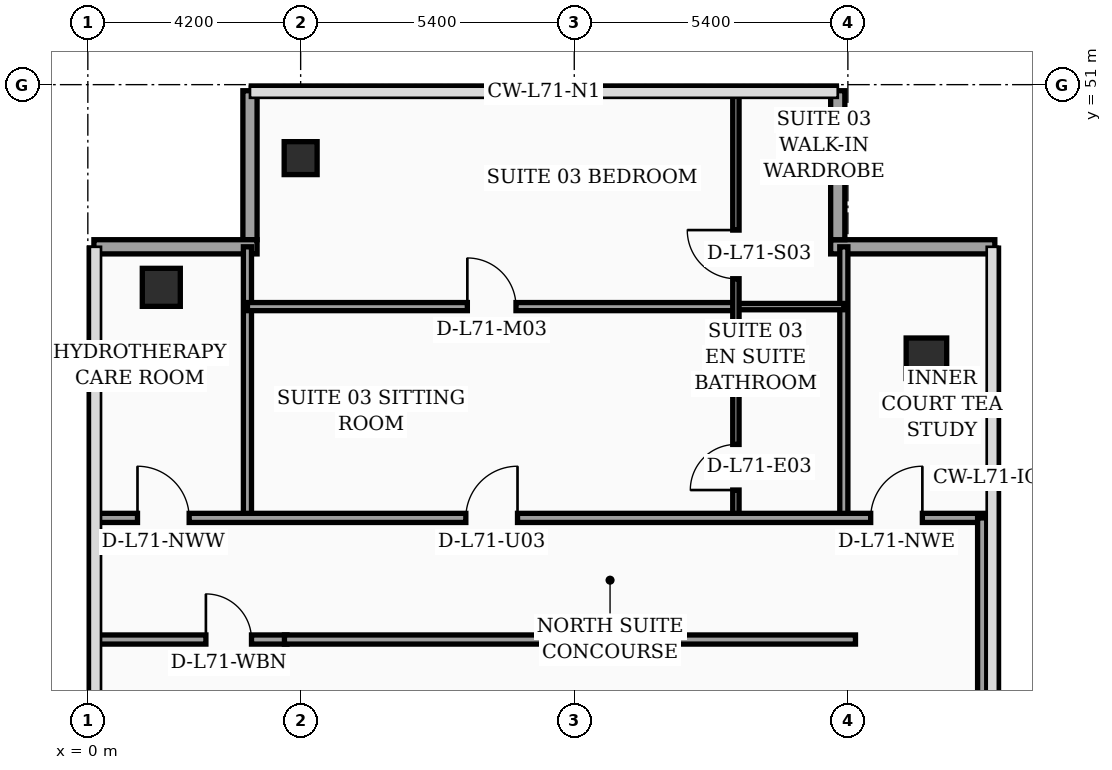
"""IFC4 building model, lengths in metres.
Left out: names, types, materials, properties, quantities, classifications, styles, units other than length and angle.
Written with IfcOpenShell. Run it as: python <this file> out.ifc"""

import sys

from ifc_helpers import new_model, si_unit, direction, frame, frame_2d, origin, origin_2d, place, context, subcontext, project, spatial, rectangle, hollow_rectangle, extrude, element, fill, save


model = new_model("IFC4")
c1 = context("Model", 3, precision=1e-05, world=origin(), true_north=direction((0.0, 1.0)))
c2 = subcontext(c1, "Body", "Model", "MODEL_VIEW")
j1 = project(units=[si_unit("LENGTHUNIT", "METRE"), si_unit("PLANEANGLEUNIT", "RADIAN")], contexts=[c1])
p1 = place(None, origin())
s1 = spatial("IfcSite", under=j1, at=p1, CompositionType="ELEMENT")
p2 = place(p1, origin())
s2 = spatial("IfcBuilding", under=s1, at=p2, CompositionType="ELEMENT")
p3 = place(p2, frame((0.0, 0.0, 287.3)))
s3 = spatial("IfcBuildingStorey", under=s2, at=p3, CompositionType="ELEMENT", Elevation=287.3)
p4 = place(p3, frame((1.45, 47.0, 0.0), z_axis=(0.0, 0.0, 1.0), x_axis=(1.0, 0.0, 0.0)))
e1 = element("IfcColumn", 1, at=p4, inside=s3, PredefinedType="COLUMN", context=c2, shape_type="SweptSolid", body=[
    extrude(hollow_rectangle(XDim=0.75, YDim=0.75, WallThickness=0.032, at=origin_2d()), origin(), (0.0, 0.0, 1.0), 3.56),
])
p5 = place(p3, frame((4.2, 49.55, 0.0), z_axis=(0.0, 0.0, 1.0), x_axis=(1.0, 0.0, 0.0)))
e2 = element("IfcColumn", 2, at=p5, inside=s3, PredefinedType="COLUMN", context=c2, shape_type="SweptSolid", body=[
    extrude(hollow_rectangle(XDim=0.65, YDim=0.65, WallThickness=0.028, at=origin_2d()), origin(), (0.0, 0.0, 1.0), 3.56),
])
p6 = place(p3, frame((16.55, 45.6, 0.0), z_axis=(0.0, 0.0, 1.0), x_axis=(1.0, 0.0, 0.0)))
e3 = element("IfcColumn", 3, at=p6, inside=s3, PredefinedType="COLUMN", context=c2, shape_type="SweptSolid", body=[
    extrude(rectangle(XDim=0.8, YDim=0.8, at=origin_2d()), origin(), (0.0, 0.0, 1.0), 3.56),
])
p7 = place(p3, frame((17.9, 47.8, 0.0), z_axis=(0.0, 0.0, 1.0), x_axis=(-1.0, 0.0, 0.0)))
e4 = element("IfcWall", 4, at=p7, inside=s3, PredefinedType="SOLIDWALL", context=c2, shape_type="SweptSolid", body=[
    extrude(rectangle(XDim=3.24, YDim=0.28, at=frame_2d((1.62, 0.0))), origin(), (0.0, 0.0, 1.0), 3.56),
])
p8 = place(p3, frame((14.8, 47.94, 0.0), z_axis=(0.0, 0.0, 1.0), x_axis=(0.0, 1.0, 0.0)))
e5 = element("IfcWall", 5, at=p8, inside=s3, PredefinedType="SOLIDWALL", context=c2, shape_type="SweptSolid", body=[
    extrude(rectangle(XDim=2.94, YDim=0.28, at=frame_2d((1.47, 0.0))), origin(), (0.0, 0.0, 1.0), 3.56),
])
p9 = place(p3, frame((3.2, 50.88, 0.0), z_axis=(0.0, 0.0, 1.0), x_axis=(0.0, -1.0, 0.0)))
e6 = element("IfcWall", 6, at=p9, inside=s3, PredefinedType="SOLIDWALL", context=c2, shape_type="SweptSolid", body=[
    extrude(rectangle(XDim=2.94, YDim=0.28, at=frame_2d((1.47, 0.0))), origin(), (0.0, 0.0, 1.0), 3.09),
])
p10 = place(p3, frame((3.34, 47.8, 0.0), z_axis=(0.0, 0.0, 1.0), x_axis=(-1.0, 0.0, 0.0)))
e7 = element("IfcWall", 7, at=p10, inside=s3, PredefinedType="SOLIDWALL", context=c2, shape_type="SweptSolid", body=[
    extrude(rectangle(XDim=3.22, YDim=0.28, at=frame_2d((1.61, 0.0))), origin(), (0.0, 0.0, 1.0), 3.09),
])
p11 = place(p3, frame((0.08, 40.05, 0.0), z_axis=(0.0, 0.0, 1.0), x_axis=(1.0, 0.0, 0.0)))
e8 = element("IfcWall", 8, at=p11, inside=s3, PredefinedType="PARTITIONING", context=c2, shape_type="SweptSolid", body=[
    extrude(rectangle(XDim=3.85, YDim=0.18, at=frame_2d((1.925, 0.0))), origin(), (0.0, 0.0, 1.0), 2.99),
])
p12 = place(p11, frame((2.25, 0.0, 0.0)))
e9 = element("IfcOpeningElement", 9, at=p12, cuts=e8, PredefinedType="OPENING", context=c2, shape_type="SweptSolid", body=[
    extrude(rectangle(XDim=0.9, YDim=2.15, at=frame_2d((0.45, 1.075))), frame((0.0, 0.1, 0.0), z_axis=(0.0, -1.0, 0.0), x_axis=(1.0, 0.0, 0.0)), (0.0, 0.0, 1.0), 0.2),
])
p13 = place(p3, frame((3.15, 42.45, 0.0), z_axis=(0.0, 0.0, 1.0), x_axis=(0.0, 1.0, 0.0)))
e10 = element("IfcWall", 10, at=p13, inside=s3, PredefinedType="PARTITIONING", context=c2, shape_type="SweptSolid", body=[
    extrude(rectangle(XDim=5.35, YDim=0.16, at=frame_2d((2.675, 0.0))), origin(), (0.0, 0.0, 1.0), 3.14),
])
p14 = place(p3, frame((14.92, 42.45, 0.0), z_axis=(0.0, 0.0, 1.0), x_axis=(0.0, 1.0, 0.0)))
e11 = element("IfcWall", 11, at=p14, inside=s3, PredefinedType="PARTITIONING", context=c2, shape_type="SweptSolid", body=[
    extrude(rectangle(XDim=5.35, YDim=0.16, at=frame_2d((2.675, 0.0))), origin(), (0.0, 0.0, 1.0), 3.09),
])
p15 = place(p3, frame((12.79, 46.62, 0.0), z_axis=(0.0, 0.0, 1.0), x_axis=(1.0, 0.0, 0.0)))
e12 = element("IfcWall", 12, at=p15, inside=s3, PredefinedType="PARTITIONING", context=c2, shape_type="SweptSolid", body=[
    extrude(rectangle(XDim=2.13, YDim=0.125, at=frame_2d((1.065, 0.0))), origin(), (0.0, 0.0, 1.0), 3.09),
])
p16 = place(p3, frame((3.15, 46.62, 0.0), z_axis=(0.0, 0.0, 1.0), x_axis=(1.0, 0.0, 0.0)))
e13 = element("IfcWall", 13, at=p16, inside=s3, PredefinedType="PARTITIONING", context=c2, shape_type="SweptSolid", body=[
    extrude(rectangle(XDim=9.64, YDim=0.16, at=frame_2d((4.82, 0.0))), origin(), (0.0, 0.0, 1.0), 2.99),
])
p17 = place(p16, frame((4.34, 0.0, 0.0)))
e14 = element("IfcOpeningElement", 14, at=p17, cuts=e13, PredefinedType="OPENING", context=c2, shape_type="SweptSolid", body=[
    extrude(rectangle(XDim=0.96, YDim=2.2, at=frame_2d((0.48, 1.1))), frame((0.0, 0.09, 0.0), z_axis=(0.0, -1.0, 0.0), x_axis=(1.0, 0.0, 0.0)), (0.0, 0.0, 1.0), 0.18),
])
p18 = place(p3, frame((12.79, 42.45, 0.0), z_axis=(0.0, 0.0, 1.0), x_axis=(0.0, 1.0, 0.0)))
e15 = element("IfcWall", 15, at=p18, inside=s3, PredefinedType="PARTITIONING", context=c2, shape_type="SweptSolid", body=[
    extrude(rectangle(XDim=8.49, YDim=0.125, at=frame_2d((4.245, 0.0))), origin(), (0.0, 0.0, 1.0), 3.09),
])
p19 = place(p18, frame((0.55, 0.0, 0.0)))
e16 = element("IfcOpeningElement", 16, at=p19, cuts=e15, PredefinedType="OPENING", context=c2, shape_type="SweptSolid", body=[
    extrude(rectangle(XDim=0.9, YDim=2.15, at=frame_2d((0.45, 1.075))), frame((0.0, 0.073, 0.0), z_axis=(0.0, -1.0, 0.0), x_axis=(1.0, 0.0, 0.0)), (0.0, 0.0, 1.0), 0.145),
])
p20 = place(p18, frame((4.72, 0.0, 0.0)))
e17 = element("IfcOpeningElement", 17, at=p20, cuts=e15, PredefinedType="OPENING", context=c2, shape_type="SweptSolid", body=[
    extrude(rectangle(XDim=0.96, YDim=2.2, at=frame_2d((0.48, 1.1))), frame((0.0, 0.073, 0.0), z_axis=(0.0, -1.0, 0.0), x_axis=(1.0, 0.0, 0.0)), (0.0, 0.0, 1.0), 0.145),
])
p21 = place(p3, frame((0.08, 42.45, 0.0), z_axis=(0.0, 0.0, 1.0), x_axis=(1.0, 0.0, 0.0)))
e18 = element("IfcWall", 18, at=p21, inside=s3, PredefinedType="PARTITIONING", context=c2, shape_type="SweptSolid", body=[
    extrude(rectangle(XDim=17.77, YDim=0.18, at=frame_2d((8.885, 0.0))), origin(), (0.0, 0.0, 1.0), 2.99),
])
p22 = place(p21, frame((0.9, 0.0, 0.0)))
e19 = element("IfcOpeningElement", 19, at=p22, cuts=e18, PredefinedType="OPENING", context=c2, shape_type="SweptSolid", body=[
    extrude(rectangle(XDim=1.02, YDim=2.2, at=frame_2d((0.51, 1.1))), frame((0.0, 0.1, 0.0), z_axis=(0.0, -1.0, 0.0), x_axis=(1.0, 0.0, 0.0)), (0.0, 0.0, 1.0), 0.2),
])
p23 = place(p21, frame((7.38, 0.0, 0.0)))
e20 = element("IfcOpeningElement", 20, at=p23, cuts=e18, PredefinedType="OPENING", context=c2, shape_type="SweptSolid", body=[
    extrude(rectangle(XDim=1.02, YDim=2.2, at=frame_2d((0.51, 1.1))), frame((0.0, 0.1, 0.0), z_axis=(0.0, -1.0, 0.0), x_axis=(1.0, 0.0, 0.0)), (0.0, 0.0, 1.0), 0.2),
])
p24 = place(p21, frame((15.37, 0.0, 0.0)))
e21 = element("IfcOpeningElement", 21, at=p24, cuts=e18, PredefinedType="OPENING", context=c2, shape_type="SweptSolid", body=[
    extrude(rectangle(XDim=1.02, YDim=2.2, at=frame_2d((0.51, 1.1))), frame((0.0, 0.1, 0.0), z_axis=(0.0, -1.0, 0.0), x_axis=(1.0, 0.0, 0.0)), (0.0, 0.0, 1.0), 0.2),
])
p25 = place(p3, frame((17.65, 24.3, 0.0), z_axis=(0.0, 0.0, 1.0), x_axis=(0.0, 1.0, 0.0)))
e22 = element("IfcWall", 22, at=p25, inside=s3, PredefinedType="PARTITIONING", context=c2, shape_type="SweptSolid", body=[
    extrude(rectangle(XDim=18.15, YDim=0.18, at=frame_2d((9.075, 0.0))), origin(), (0.0, 0.0, 1.0), 2.99),
])
p26 = place(p25, frame((3.2, 0.0, 0.0)))
e23 = element("IfcOpeningElement", 23, at=p26, cuts=e22, PredefinedType="OPENING", context=c2, shape_type="SweptSolid", body=[
    extrude(rectangle(XDim=1.02, YDim=2.2, at=frame_2d((0.51, 1.1))), frame((0.0, 0.1, 0.0), z_axis=(0.0, -1.0, 0.0), x_axis=(1.0, 0.0, 0.0)), (0.0, 0.0, 1.0), 0.2),
])
p27 = place(p3, frame((3.88, 40.05, 0.0), z_axis=(0.0, 0.0, 1.0), x_axis=(1.0, 0.0, 0.0)))
e24 = element("IfcWall", 24, at=p27, inside=s3, PredefinedType="PARTITIONING", context=c2, shape_type="SweptSolid", body=[
    extrude(rectangle(XDim=11.27, YDim=0.18, at=frame_2d((5.635, 0.0))), origin(), (0.0, 0.0, 1.0), 2.99),
])
p28 = place(p12, origin())
e25 = element("IfcDoor", 25, at=p28, inside=s3, OperationType="SINGLE_SWING_LEFT", PredefinedType="DOOR", context=c2, shape_type="SweptSolid", body=[
    extrude(rectangle(XDim=0.9, YDim=2.15, at=frame_2d((0.45, 1.075))), frame((0.0, 0.025, 0.0), z_axis=(0.0, -1.0, 0.0), x_axis=(1.0, 0.0, 0.0)), (0.0, 0.0, 1.0), 0.05),
])
fill(e9, e25)
p29 = place(p17, origin())
e26 = element("IfcDoor", 26, at=p29, inside=s3, OperationType="SINGLE_SWING_LEFT", PredefinedType="DOOR", context=c2, shape_type="SweptSolid", body=[
    extrude(rectangle(XDim=0.96, YDim=2.2, at=frame_2d((0.48, 1.1))), frame((0.0, 0.025, 0.0), z_axis=(0.0, -1.0, 0.0), x_axis=(1.0, 0.0, 0.0)), (0.0, 0.0, 1.0), 0.05),
])
fill(e14, e26)
p30 = place(p19, origin())
e27 = element("IfcDoor", 27, at=p30, inside=s3, OperationType="SINGLE_SWING_LEFT", PredefinedType="DOOR", context=c2, shape_type="SweptSolid", body=[
    extrude(rectangle(XDim=0.9, YDim=2.15, at=frame_2d((0.45, 1.075))), frame((0.0, 0.025, 0.0), z_axis=(0.0, -1.0, 0.0), x_axis=(1.0, 0.0, 0.0)), (0.0, 0.0, 1.0), 0.05),
])
fill(e16, e27)
p31 = place(p20, origin())
e28 = element("IfcDoor", 28, at=p31, inside=s3, OperationType="SINGLE_SWING_RIGHT", PredefinedType="DOOR", context=c2, shape_type="SweptSolid", body=[
    extrude(rectangle(XDim=0.96, YDim=2.2, at=frame_2d((0.48, 1.1))), frame((0.0, 0.025, 0.0), z_axis=(0.0, -1.0, 0.0), x_axis=(1.0, 0.0, 0.0)), (0.0, 0.0, 1.0), 0.05),
])
fill(e17, e28)
p32 = place(p22, origin())
e29 = element("IfcDoor", 29, at=p32, inside=s3, OperationType="SINGLE_SWING_LEFT", PredefinedType="DOOR", context=c2, shape_type="SweptSolid", body=[
    extrude(rectangle(XDim=1.02, YDim=2.2, at=frame_2d((0.51, 1.1))), frame((0.0, 0.025, 0.0), z_axis=(0.0, -1.0, 0.0), x_axis=(1.0, 0.0, 0.0)), (0.0, 0.0, 1.0), 0.05),
])
fill(e19, e29)
p33 = place(p23, origin())
e30 = element("IfcDoor", 30, at=p33, inside=s3, OperationType="SINGLE_SWING_RIGHT", PredefinedType="DOOR", context=c2, shape_type="SweptSolid", body=[
    extrude(rectangle(XDim=1.02, YDim=2.2, at=frame_2d((0.51, 1.1))), frame((0.0, 0.025, 0.0), z_axis=(0.0, -1.0, 0.0), x_axis=(1.0, 0.0, 0.0)), (0.0, 0.0, 1.0), 0.05),
])
fill(e20, e30)
p34 = place(p24, origin())
e31 = element("IfcDoor", 31, at=p34, inside=s3, OperationType="SINGLE_SWING_RIGHT", PredefinedType="DOOR", context=c2, shape_type="SweptSolid", body=[
    extrude(rectangle(XDim=1.02, YDim=2.2, at=frame_2d((0.51, 1.1))), frame((0.0, 0.025, 0.0), z_axis=(0.0, -1.0, 0.0), x_axis=(1.0, 0.0, 0.0)), (0.0, 0.0, 1.0), 0.05),
])
fill(e21, e31)
save(model, sys.argv[1])
